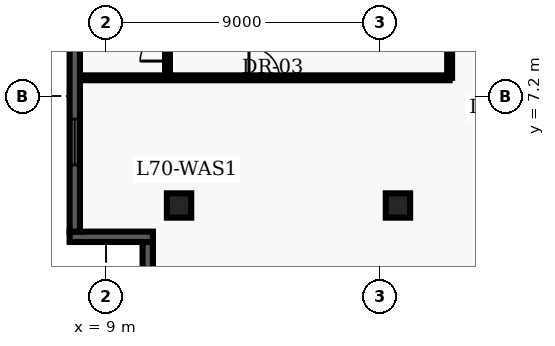
"""IFC4 building model, lengths in metres.
Left out: names, types, materials, properties, quantities, classifications, styles, units other than length and angle.
Written with IfcOpenShell. Run it as: python <this file> out.ifc"""

import sys

from ifc_helpers import new_model, entity, si_unit, converted_unit, direction, frame, origin_with_axes, origin_2d_with_axis, place, context, subcontext, project, spatial, polyline, rectangle, outline, extrude, element, fill, save


model = new_model("IFC4")
c1 = context("Model", 3, precision=1e-05, world=origin_with_axes(), true_north=direction((0.0, 1.0)))
c2 = subcontext(c1, "Body", "Model", "MODEL_VIEW")
j1 = project(units=[si_unit("LENGTHUNIT", "METRE"), converted_unit("PLANEANGLEUNIT", "DEGREE", entity("IfcPlaneAngleMeasure", 0.017), si_unit("PLANEANGLEUNIT", "RADIAN"), dimensions=[0, 0, 0, 0, 0, 0, 0])], contexts=[c1])
p1 = place(None, origin_with_axes())
s1 = spatial("IfcSite", under=j1, at=p1, CompositionType="ELEMENT")
p2 = place(p1, origin_with_axes())
s2 = spatial("IfcBuilding", under=s1, at=p2, CompositionType="ELEMENT")
p3 = place(p2, frame((0.0, 0.0, 284.1), z_axis=(0.0, 0.0, 1.0), x_axis=(1.0, 0.0, 0.0)))
s3 = spatial("IfcBuildingStorey", under=s2, at=p3, CompositionType="ELEMENT", Elevation=284.1)
for number, where, z_axis, x_axis in (
    (1, (11.4, 3.6, 0.0), (0.0, 0.0, 1.0), (1.0, 0.0, 0.0)),
    (2, (18.6, 3.6, 0.0), (0.0, 0.0, 1.0), (1.0, 0.0, 0.0)),
):
    element("IfcColumn", number, at=place(p3, frame(where, z_axis=z_axis, x_axis=x_axis)), inside=s3, PredefinedType="COLUMN", context=c2, shape_type="SweptSolid", body=[
        extrude(rectangle(XDim=0.8, YDim=0.8, at=origin_2d_with_axis()), origin_with_axes(), (0.0, 0.0, 1.0), 3.9),
    ])
p4 = place(p3, frame((8.135, 7.8, 0.0), z_axis=(0.0, 0.0, 1.0), x_axis=(1.0, 0.0, 0.0)))
e3 = element("IfcWall", 3, at=p4, inside=s3, PredefinedType="PARTITIONING", context=c2, shape_type="SweptSolid", body=[
    extrude(outline(polyline([(0.0, -0.08), (12.165, -0.08), (12.165, 0.08), (0.0, 0.08), (0.0, -0.08)])), origin_with_axes(), (0.0, 0.0, 1.0), 2.64),
])
p5 = place(p4, frame((6.065, 0.0, 0.0), z_axis=(0.0, 0.0, 1.0), x_axis=(1.0, 0.0, 0.0)))
e4 = element("IfcOpeningElement", 4, at=p5, cuts=e3, PredefinedType="OPENING", context=c2, shape_type="SweptSolid", body=[
    extrude(rectangle(XDim=1.0, YDim=0.18, at=origin_2d_with_axis()), origin_with_axes(), (0.0, 0.0, 1.0), 2.15),
])
p6 = place(p3, frame((20.3, 7.8, 0.0), z_axis=(0.0, 0.0, 1.0), x_axis=(0.0, 1.0, 0.0)))
e5 = element("IfcWall", 5, at=p6, inside=s3, PredefinedType="PARTITIONING", context=c2, shape_type="SweptSolid", body=[
    extrude(outline(polyline([(0.0, -0.08), (32.7, -0.08), (32.7, 0.08), (0.0, 0.08), (0.0, -0.08)])), origin_with_axes(), (0.0, 0.0, 1.0), 2.64),
])
p7 = place(p6, frame((25.025, 0.0, 0.0), z_axis=(0.0, 0.0, 1.0), x_axis=(1.0, 0.0, 0.0)))
e6 = element("IfcOpeningElement", 6, at=p7, cuts=e5, PredefinedType="OPENING", context=c2, shape_type="SweptSolid", body=[
    extrude(rectangle(XDim=1.05, YDim=0.18, at=origin_2d_with_axis()), origin_with_axes(), (0.0, 0.0, 1.0), 2.15),
])
p8 = place(p6, frame((14.273, 0.0, 0.0), z_axis=(0.0, 0.0, 1.0), x_axis=(1.0, 0.0, 0.0)))
e7 = element("IfcOpeningElement", 7, at=p8, cuts=e5, PredefinedType="OPENING", context=c2, shape_type="SweptSolid", body=[
    extrude(rectangle(XDim=1.0, YDim=0.18, at=origin_2d_with_axis()), origin_with_axes(), (0.0, 0.0, 1.0), 2.15),
])
p9 = place(p6, frame((18.447, 0.0, 0.0), z_axis=(0.0, 0.0, 1.0), x_axis=(1.0, 0.0, 0.0)))
e8 = element("IfcOpeningElement", 8, at=p9, cuts=e5, PredefinedType="OPENING", context=c2, shape_type="SweptSolid", body=[
    extrude(rectangle(XDim=1.0, YDim=0.18, at=origin_2d_with_axis()), origin_with_axes(), (0.0, 0.0, 1.0), 2.15),
])
p10 = place(p6, frame((6.675, 0.0, 0.0), z_axis=(0.0, 0.0, 1.0), x_axis=(1.0, 0.0, 0.0)))
e9 = element("IfcOpeningElement", 9, at=p10, cuts=e5, PredefinedType="OPENING", context=c2, shape_type="SweptSolid", body=[
    extrude(rectangle(XDim=1.05, YDim=0.18, at=origin_2d_with_axis()), origin_with_axes(), (0.0, 0.0, 1.0), 2.15),
])
p11 = place(p3, frame((11.02, 7.8, 0.0), z_axis=(0.0, 0.0, 1.0), x_axis=(0.0, 1.0, 0.0)))
e10 = element("IfcWall", 10, at=p11, inside=s3, PredefinedType="PARTITIONING", context=c2, shape_type="SweptSolid", body=[
    extrude(outline(polyline([(0.0, -0.08), (2.85, -0.08), (2.85, 0.08), (0.0, 0.08), (0.0, -0.08)])), origin_with_axes(), (0.0, 0.0, 1.0), 2.64),
])
p12 = place(p11, frame((1.0, 0.0, 0.0), z_axis=(0.0, 0.0, 1.0), x_axis=(1.0, 0.0, 0.0)))
e11 = element("IfcOpeningElement", 11, at=p12, cuts=e10, PredefinedType="OPENING", context=c2, shape_type="SweptSolid", body=[
    extrude(rectangle(XDim=0.9, YDim=0.18, at=origin_2d_with_axis()), origin_with_axes(), (0.0, 0.0, 1.0), 2.15),
])
p13 = place(p3, frame((10.37, 0.34, 0.0), z_axis=(0.0, 0.0, 1.0), x_axis=(0.0, 1.0, 0.0)))
e12 = element("IfcWall", 12, at=p13, inside=s3, PredefinedType="SOLIDWALL", context=c2, shape_type="SweptSolid", body=[
    extrude(outline(polyline([(0.0, -0.17), (2.06, -0.17), (2.06, 0.17), (0.0, 0.17), (0.0, -0.17)])), origin_with_axes(), (0.0, 0.0, 1.0), 3.6),
])
p14 = place(p3, frame((10.54, 2.57, 0.0), z_axis=(0.0, 0.0, 1.0), x_axis=(-1.0, 0.0, 0.0)))
e13 = element("IfcWall", 13, at=p14, inside=s3, PredefinedType="SOLIDWALL", context=c2, shape_type="SweptSolid", body=[
    extrude(outline(polyline([(0.0, -0.17), (2.74, -0.17), (2.74, 0.17), (0.0, 0.17), (0.0, -0.17)])), origin_with_axes(), (0.0, 0.0, 1.0), 3.6),
])
p15 = place(p3, frame((7.97, 2.74, 0.0), z_axis=(0.0, 0.0, 1.0), x_axis=(0.0, 1.0, 0.0)))
e14 = element("IfcWall", 14, at=p15, inside=s3, PredefinedType="SOLIDWALL", context=c2, shape_type="SweptSolid", body=[
    extrude(outline(polyline([(0.0, -0.17), (43.46, -0.17), (43.46, 0.17), (0.0, 0.17), (0.0, -0.17)])), origin_with_axes(), (0.0, 0.0, 1.0), 3.6),
])
p16 = place(p15, frame((2.948, 0.0, 0.45), z_axis=(0.0, 0.0, 1.0), x_axis=(1.0, 0.0, 0.0)))
e15 = element("IfcOpeningElement", 15, at=p16, cuts=e14, PredefinedType="OPENING", context=c2, shape_type="SweptSolid", body=[
    extrude(rectangle(XDim=1.5, YDim=0.36, at=origin_2d_with_axis()), origin_with_axes(), (0.0, 0.0, 1.0), 2.1),
])
p17 = place(p15, frame((7.643, 0.0, 0.45), z_axis=(0.0, 0.0, 1.0), x_axis=(1.0, 0.0, 0.0)))
e16 = element("IfcOpeningElement", 16, at=p17, cuts=e14, PredefinedType="OPENING", context=c2, shape_type="SweptSolid", body=[
    extrude(rectangle(XDim=1.5, YDim=0.36, at=origin_2d_with_axis()), origin_with_axes(), (0.0, 0.0, 1.0), 2.1),
])
p18 = place(p15, frame((17.034, 0.0, 0.45), z_axis=(0.0, 0.0, 1.0), x_axis=(1.0, 0.0, 0.0)))
e17 = element("IfcOpeningElement", 17, at=p18, cuts=e14, PredefinedType="OPENING", context=c2, shape_type="SweptSolid", body=[
    extrude(rectangle(XDim=1.5, YDim=0.36, at=origin_2d_with_axis()), origin_with_axes(), (0.0, 0.0, 1.0), 2.1),
])
p19 = place(p15, frame((26.426, 0.0, 0.45), z_axis=(0.0, 0.0, 1.0), x_axis=(1.0, 0.0, 0.0)))
e18 = element("IfcOpeningElement", 18, at=p19, cuts=e14, PredefinedType="OPENING", context=c2, shape_type="SweptSolid", body=[
    extrude(rectangle(XDim=1.5, YDim=0.36, at=origin_2d_with_axis()), origin_with_axes(), (0.0, 0.0, 1.0), 2.1),
])
p20 = place(p15, frame((31.571, 0.0, 0.45), z_axis=(0.0, 0.0, 1.0), x_axis=(1.0, 0.0, 0.0)))
e19 = element("IfcOpeningElement", 19, at=p20, cuts=e14, PredefinedType="OPENING", context=c2, shape_type="SweptSolid", body=[
    extrude(rectangle(XDim=1.5, YDim=0.36, at=origin_2d_with_axis()), origin_with_axes(), (0.0, 0.0, 1.0), 2.1),
])
p21 = place(p15, frame((35.817, 0.0, 0.45), z_axis=(0.0, 0.0, 1.0), x_axis=(1.0, 0.0, 0.0)))
e20 = element("IfcOpeningElement", 20, at=p21, cuts=e14, PredefinedType="OPENING", context=c2, shape_type="SweptSolid", body=[
    extrude(rectangle(XDim=1.5, YDim=0.36, at=origin_2d_with_axis()), origin_with_axes(), (0.0, 0.0, 1.0), 2.1),
])
p22 = place(p15, frame((40.512, 0.0, 0.45), z_axis=(0.0, 0.0, 1.0), x_axis=(1.0, 0.0, 0.0)))
e21 = element("IfcOpeningElement", 21, at=p22, cuts=e14, PredefinedType="OPENING", context=c2, shape_type="SweptSolid", body=[
    extrude(rectangle(XDim=1.5, YDim=0.36, at=origin_2d_with_axis()), origin_with_axes(), (0.0, 0.0, 1.0), 2.1),
])
p23 = place(p11, frame((1.0, 0.0, 0.0), z_axis=(0.0, 0.0, 1.0), x_axis=(1.0, 0.0, 0.0)))
e22 = element("IfcDoor", 22, at=p23, inside=s3, OperationType="SINGLE_SWING_LEFT", PredefinedType="DOOR", context=c2, shape_type="SweptSolid", body=[
    extrude(rectangle(XDim=0.9, YDim=0.09, at=origin_2d_with_axis()), origin_with_axes(), (0.0, 0.0, 1.0), 2.15),
])
fill(e11, e22)
p24 = place(p4, frame((6.065, 0.0, 0.0), z_axis=(0.0, 0.0, 1.0), x_axis=(1.0, 0.0, 0.0)))
e23 = element("IfcDoor", 23, at=p24, inside=s3, OperationType="SINGLE_SWING_LEFT", PredefinedType="DOOR", context=c2, shape_type="SweptSolid", body=[
    extrude(rectangle(XDim=1.0, YDim=0.09, at=origin_2d_with_axis()), origin_with_axes(), (0.0, 0.0, 1.0), 2.15),
])
fill(e4, e23)
p25 = place(p15, frame((2.948, 0.0, 0.45), z_axis=(0.0, 0.0, 1.0), x_axis=(1.0, 0.0, 0.0)))
e24 = element("IfcWindow", 24, at=p25, inside=s3, PredefinedType="WINDOW", context=c2, shape_type="SweptSolid", body=[
    extrude(rectangle(XDim=1.5, YDim=0.09, at=origin_2d_with_axis()), origin_with_axes(), (0.0, 0.0, 1.0), 2.1),
])
fill(e15, e24)
save(model, sys.argv[1])
